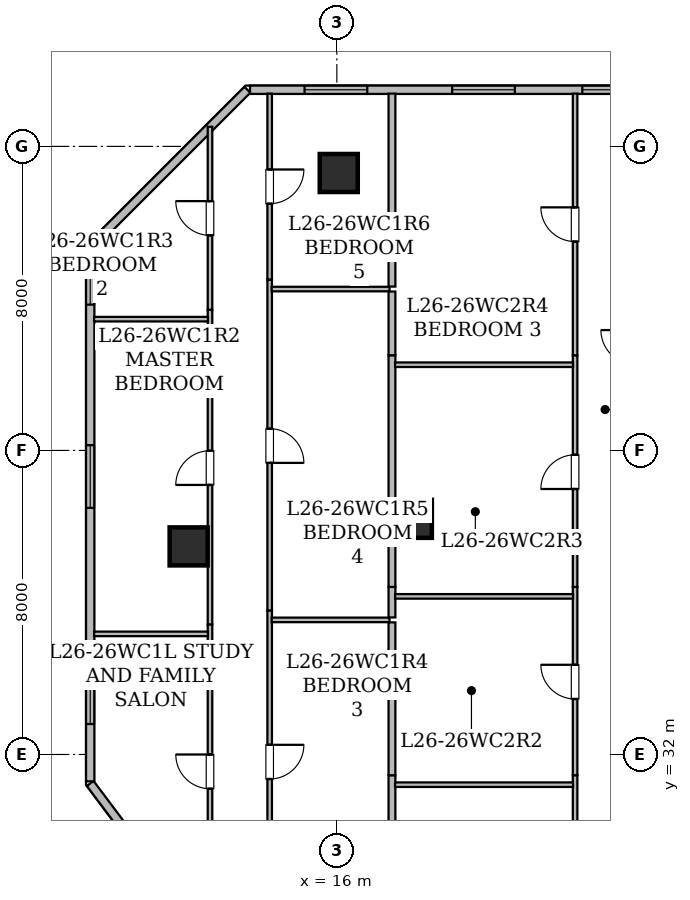
"""IFC4 building model, lengths in metres.
Left out: names, types, materials, properties, quantities, classifications, styles, units other than length and angle.
Written with IfcOpenShell. Run it as: python <this file> out.ifc"""

import sys

from ifc_helpers import new_model, si_unit, direction, frame, frame_2d, origin, origin_2d, place, context, subcontext, project, spatial, rectangle, hollow_rectangle, extrude, element, fill, save


model = new_model("IFC4")
c1 = context("Model", 3, precision=1e-05, world=origin(), true_north=direction((0.0, 1.0)))
c2 = subcontext(c1, "Body", "Model", "MODEL_VIEW")
j1 = project(units=[si_unit("LENGTHUNIT", "METRE"), si_unit("PLANEANGLEUNIT", "RADIAN")], contexts=[c1])
p1 = place(None, origin())
s1 = spatial("IfcSite", under=j1, at=p1, CompositionType="ELEMENT")
p2 = place(p1, origin())
s2 = spatial("IfcBuilding", under=s1, at=p2, CompositionType="ELEMENT")
p3 = place(p2, frame((0.0, 0.0, 105.55)))
s3 = spatial("IfcBuildingStorey", under=s2, at=p3, CompositionType="ELEMENT", Elevation=105.55)
for number, where, z_axis, x_axis in (
    (1, (16.05, 47.3, 0.0), (0.0, 0.0, 1.0), (1.0, 0.0, 0.0)),
    (2, (12.1, 37.475, 0.0), (0.0, 0.0, 1.0), (1.0, 0.0, 0.0)),
    (3, (18.0, 38.2, 0.0), (0.0, 0.0, 1.0), (1.0, 0.0, 0.0)),
):
    element("IfcColumn", number, at=place(p3, frame(where, z_axis=z_axis, x_axis=x_axis)), inside=s3, PredefinedType="COLUMN", context=c2, shape_type="SweptSolid", body=[
        extrude(hollow_rectangle(XDim=1.0, YDim=1.0, WallThickness=0.05, at=origin_2d()), origin(), (0.0, 0.0, 1.0), 3.65),
    ])
p4 = place(p3, frame((11.881, 28.077, 0.0), z_axis=(0.0, 0.0, 1.0), x_axis=(-0.600158184825, 0.799881336942, 0.0)))
e4 = element("IfcWall", 4, at=p4, inside=s3, PredefinedType="STANDARD", context=c2, shape_type="SweptSolid", body=[
    extrude(rectangle(XDim=3.951, YDim=0.22, at=frame_2d((1.975, 0.0))), origin(), (0.0, 0.0, 1.0), 3.43),
])
p5 = place(p3, frame((9.51, 31.293, 0.0), z_axis=(0.0, 0.0, 1.0), x_axis=(0.0, 1.0, 0.0)))
e5 = element("IfcWall", 5, at=p5, inside=s3, PredefinedType="STANDARD", context=c2, shape_type="SweptSolid", body=[
    extrude(rectangle(XDim=14.061, YDim=0.22, at=frame_2d((7.031, 0.0))), origin(), (0.0, 0.0, 1.0), 3.43),
])
p6 = place(p5, frame((1.508, 0.0, 0.85)))
e6 = element("IfcOpeningElement", 6, at=p6, cuts=e5, PredefinedType="OPENING", context=c2, shape_type="SweptSolid", body=[
    extrude(rectangle(XDim=1.65, YDim=1.55, at=frame_2d((0.825, 0.775))), frame((0.0, 0.12, 0.0), z_axis=(0.0, -1.0, 0.0), x_axis=(1.0, 0.0, 0.0)), (0.0, 0.0, 1.0), 0.24),
])
p7 = place(p5, frame((7.195, 0.0, 0.85)))
e7 = element("IfcOpeningElement", 7, at=p7, cuts=e5, PredefinedType="OPENING", context=c2, shape_type="SweptSolid", body=[
    extrude(rectangle(XDim=1.65, YDim=1.55, at=frame_2d((0.825, 0.775))), frame((0.0, 0.12, 0.0), z_axis=(0.0, -1.0, 0.0), x_axis=(1.0, 0.0, 0.0)), (0.0, 0.0, 1.0), 0.24),
])
p8 = place(p5, frame((12.543, 0.0, 0.85)))
e8 = element("IfcOpeningElement", 8, at=p8, cuts=e5, PredefinedType="OPENING", context=c2, shape_type="SweptSolid", body=[
    extrude(rectangle(XDim=1.35, YDim=1.5, at=frame_2d((0.675, 0.75))), frame((0.0, 0.12, 0.0), z_axis=(0.0, -1.0, 0.0), x_axis=(1.0, 0.0, 0.0)), (0.0, 0.0, 1.0), 0.24),
])
p9 = place(p3, frame((9.558, 45.402, 0.0), z_axis=(0.0, 0.0, 1.0), x_axis=(0.707106781187, 0.707106781187, 0.0)))
e9 = element("IfcWall", 9, at=p9, inside=s3, PredefinedType="STANDARD", context=c2, shape_type="SweptSolid", body=[
    extrude(rectangle(XDim=5.781, YDim=0.22, at=frame_2d((2.891, 0.0))), origin(), (0.0, 0.0, 1.0), 3.43),
])
p10 = place(p3, frame((13.715, 49.49, 0.0), z_axis=(0.0, 0.0, 1.0), x_axis=(1.0, 0.0, 0.0)))
e10 = element("IfcWall", 10, at=p10, inside=s3, PredefinedType="STANDARD", context=c2, shape_type="SweptSolid", body=[
    extrude(rectangle(XDim=38.639, YDim=0.22, at=frame_2d((19.319, 0.0))), origin(), (0.0, 0.0, 1.0), 3.43),
])
p11 = place(p10, frame((1.435, 0.0, 0.85)))
e11 = element("IfcOpeningElement", 11, at=p11, cuts=e10, PredefinedType="OPENING", context=c2, shape_type="SweptSolid", body=[
    extrude(rectangle(XDim=1.65, YDim=1.55, at=frame_2d((0.825, 0.775))), frame((0.0, 0.12, 0.0), z_axis=(0.0, -1.0, 0.0), x_axis=(1.0, 0.0, 0.0)), (0.0, 0.0, 1.0), 0.24),
])
p12 = place(p10, frame((10.802, 0.0, 0.85)))
e12 = element("IfcOpeningElement", 12, at=p12, cuts=e10, PredefinedType="OPENING", context=c2, shape_type="SweptSolid", body=[
    extrude(rectangle(XDim=1.65, YDim=1.55, at=frame_2d((0.825, 0.775))), frame((0.0, 0.12, 0.0), z_axis=(0.0, -1.0, 0.0), x_axis=(1.0, 0.0, 0.0)), (0.0, 0.0, 1.0), 0.24),
])
p13 = place(p10, frame((8.744, 0.0, 0.8)))
e13 = element("IfcOpeningElement", 13, at=p13, cuts=e10, PredefinedType="OPENING", context=c2, shape_type="SweptSolid", body=[
    extrude(rectangle(XDim=1.2, YDim=1.5, at=frame_2d((0.6, 0.75))), frame((0.0, 0.12, 0.0), z_axis=(0.0, -1.0, 0.0), x_axis=(1.0, 0.0, 0.0)), (0.0, 0.0, 1.0), 0.24),
])
p14 = place(p10, frame((5.319, 0.0, 0.85)))
e14 = element("IfcOpeningElement", 14, at=p14, cuts=e10, PredefinedType="OPENING", context=c2, shape_type="SweptSolid", body=[
    extrude(rectangle(XDim=1.65, YDim=1.55, at=frame_2d((0.825, 0.775))), frame((0.0, 0.12, 0.0), z_axis=(0.0, -1.0, 0.0), x_axis=(1.0, 0.0, 0.0)), (0.0, 0.0, 1.0), 0.24),
])
p15 = place(p10, frame((15.665, 0.0, 0.85)))
e15 = element("IfcOpeningElement", 15, at=p15, cuts=e10, PredefinedType="OPENING", context=c2, shape_type="SweptSolid", body=[
    extrude(rectangle(XDim=1.65, YDim=1.55, at=frame_2d((0.825, 0.775))), frame((0.0, 0.12, 0.0), z_axis=(0.0, -1.0, 0.0), x_axis=(1.0, 0.0, 0.0)), (0.0, 0.0, 1.0), 0.24),
])
p16 = place(p10, frame((22.93, 0.0, 0.85)))
e16 = element("IfcOpeningElement", 16, at=p16, cuts=e10, PredefinedType="OPENING", context=c2, shape_type="SweptSolid", body=[
    extrude(rectangle(XDim=1.65, YDim=1.55, at=frame_2d((0.825, 0.775))), frame((0.0, 0.12, 0.0), z_axis=(0.0, -1.0, 0.0), x_axis=(1.0, 0.0, 0.0)), (0.0, 0.0, 1.0), 0.24),
])
p17 = place(p10, frame((30.23, 0.0, 0.85)))
e17 = element("IfcOpeningElement", 17, at=p17, cuts=e10, PredefinedType="OPENING", context=c2, shape_type="SweptSolid", body=[
    extrude(rectangle(XDim=1.65, YDim=1.55, at=frame_2d((0.825, 0.775))), frame((0.0, 0.12, 0.0), z_axis=(0.0, -1.0, 0.0), x_axis=(1.0, 0.0, 0.0)), (0.0, 0.0, 1.0), 0.24),
])
p18 = place(p10, frame((36.367, 0.0, 0.85)))
e18 = element("IfcOpeningElement", 18, at=p18, cuts=e10, PredefinedType="OPENING", context=c2, shape_type="SweptSolid", body=[
    extrude(rectangle(XDim=1.65, YDim=1.55, at=frame_2d((0.825, 0.775))), frame((0.0, 0.12, 0.0), z_axis=(0.0, -1.0, 0.0), x_axis=(1.0, 0.0, 0.0)), (0.0, 0.0, 1.0), 0.24),
])
p19 = place(p3, frame((12.662, 25.26, 0.0), z_axis=(0.0, 0.0, 1.0), x_axis=(0.0, 1.0, 0.0)))
e19 = element("IfcWall", 19, at=p19, inside=s3, PredefinedType="PARTITIONING", context=c2, shape_type="SweptSolid", body=[
    extrude(rectangle(XDim=10.162, YDim=0.12, at=frame_2d((5.081, 0.0))), origin(), (0.0, 0.0, 1.0), 3.43),
])
p20 = place(p19, frame((5.839, 0.0, 0.0)))
e20 = element("IfcOpeningElement", 20, at=p20, cuts=e19, PredefinedType="OPENING", context=c2, shape_type="SweptSolid", body=[
    extrude(rectangle(XDim=0.9, YDim=2.1, at=frame_2d((0.45, 1.05))), frame((0.0, 0.07, 0.0), z_axis=(0.0, -1.0, 0.0), x_axis=(1.0, 0.0, 0.0)), (0.0, 0.0, 1.0), 0.14),
])
p21 = place(p3, frame((12.662, 35.422, 0.0), z_axis=(0.0, 0.0, 1.0), x_axis=(0.0, 1.0, 0.0)))
e21 = element("IfcWall", 21, at=p21, inside=s3, PredefinedType="PARTITIONING", context=c2, shape_type="SweptSolid", body=[
    extrude(rectangle(XDim=8.281, YDim=0.12, at=frame_2d((4.14, 0.0))), origin(), (0.0, 0.0, 1.0), 2.647),
])
p22 = place(p21, frame((3.67, 0.0, 0.0)))
e22 = element("IfcOpeningElement", 22, at=p22, cuts=e21, PredefinedType="OPENING", context=c2, shape_type="SweptSolid", body=[
    extrude(rectangle(XDim=0.9, YDim=2.1, at=frame_2d((0.45, 1.05))), frame((0.0, 0.07, 0.0), z_axis=(0.0, -1.0, 0.0), x_axis=(1.0, 0.0, 0.0)), (0.0, 0.0, 1.0), 0.14),
])
p23 = place(p3, frame((12.662, 43.703, 0.0), z_axis=(0.0, 0.0, 1.0), x_axis=(0.0, 1.0, 0.0)))
e23 = element("IfcWall", 23, at=p23, inside=s3, PredefinedType="PARTITIONING", context=c2, shape_type="SweptSolid", body=[
    extrude(rectangle(XDim=4.814, YDim=0.12, at=frame_2d((2.407, 0.0))), origin(), (0.0, 0.0, 1.0), 3.43),
])
p24 = place(p23, frame((1.957, 0.0, 0.0)))
e24 = element("IfcOpeningElement", 24, at=p24, cuts=e23, PredefinedType="OPENING", context=c2, shape_type="SweptSolid", body=[
    extrude(rectangle(XDim=0.9, YDim=2.1, at=frame_2d((0.45, 1.05))), frame((0.0, 0.07, 0.0), z_axis=(0.0, -1.0, 0.0), x_axis=(1.0, 0.0, 0.0)), (0.0, 0.0, 1.0), 0.14),
])
p25 = place(p3, frame((14.232, 35.79, 0.0), z_axis=(0.0, 0.0, 1.0), x_axis=(0.0, -1.0, 0.0)))
e25 = element("IfcWall", 25, at=p25, inside=s3, PredefinedType="PARTITIONING", context=c2, shape_type="SweptSolid", body=[
    extrude(rectangle(XDim=7.93, YDim=0.12, at=frame_2d((3.965, 0.0))), origin(), (0.0, 0.0, 1.0), 3.43),
])
p26 = place(p25, frame((3.536, 0.0, 0.0)))
e26 = element("IfcOpeningElement", 26, at=p26, cuts=e25, PredefinedType="OPENING", context=c2, shape_type="SweptSolid", body=[
    extrude(rectangle(XDim=0.9, YDim=2.1, at=frame_2d((0.45, 1.05))), frame((0.0, 0.07, 0.0), z_axis=(0.0, -1.0, 0.0), x_axis=(1.0, 0.0, 0.0)), (0.0, 0.0, 1.0), 0.14),
])
p27 = place(p3, frame((14.232, 44.495, 0.0), z_axis=(0.0, 0.0, 1.0), x_axis=(0.0, -1.0, 0.0)))
e27 = element("IfcWall", 27, at=p27, inside=s3, PredefinedType="PARTITIONING", context=c2, shape_type="SweptSolid", body=[
    extrude(rectangle(XDim=8.705, YDim=0.12, at=frame_2d((4.353, 0.0))), origin(), (0.0, 0.0, 1.0), 2.647),
])
p28 = place(p27, frame((3.923, 0.0, 0.0)))
e28 = element("IfcOpeningElement", 28, at=p28, cuts=e27, PredefinedType="OPENING", context=c2, shape_type="SweptSolid", body=[
    extrude(rectangle(XDim=0.9, YDim=2.1, at=frame_2d((0.45, 1.05))), frame((0.0, 0.07, 0.0), z_axis=(0.0, -1.0, 0.0), x_axis=(1.0, 0.0, 0.0)), (0.0, 0.0, 1.0), 0.14),
])
p29 = place(p3, frame((14.232, 49.388, 0.0), z_axis=(0.0, 0.0, 1.0), x_axis=(0.0, -1.0, 0.0)))
e29 = element("IfcWall", 29, at=p29, inside=s3, PredefinedType="PARTITIONING", context=c2, shape_type="SweptSolid", body=[
    extrude(rectangle(XDim=4.893, YDim=0.12, at=frame_2d((2.446, 0.0))), origin(), (0.0, 0.0, 1.0), 3.43),
])
p30 = place(p29, frame((1.996, 0.0, 0.0)))
e30 = element("IfcOpeningElement", 30, at=p30, cuts=e29, PredefinedType="OPENING", context=c2, shape_type="SweptSolid", body=[
    extrude(rectangle(XDim=0.9, YDim=2.1, at=frame_2d((0.45, 1.05))), frame((0.0, 0.07, 0.0), z_axis=(0.0, -1.0, 0.0), x_axis=(1.0, 0.0, 0.0)), (0.0, 0.0, 1.0), 0.14),
])
p31 = place(p3, frame((9.612, 35.173, 0.0), z_axis=(0.0, 0.0, 1.0), x_axis=(1.0, 0.0, 0.0)))
e31 = element("IfcWall", 31, at=p31, inside=s3, PredefinedType="PARTITIONING", context=c2, shape_type="SweptSolid", body=[
    extrude(rectangle(XDim=2.996, YDim=0.12, at=frame_2d((1.498, 0.0))), origin(), (0.0, 0.0, 1.0), 2.876),
])
p32 = place(p3, frame((9.612, 43.454, 0.0), z_axis=(0.0, 0.0, 1.0), x_axis=(1.0, 0.0, 0.0)))
e32 = element("IfcWall", 32, at=p32, inside=s3, PredefinedType="PARTITIONING", context=c2, shape_type="SweptSolid", body=[
    extrude(rectangle(XDim=2.996, YDim=0.12, at=frame_2d((1.498, 0.0))), origin(), (0.0, 0.0, 1.0), 3.43),
])
p33 = place(p3, frame((14.286, 35.541, 0.0), z_axis=(0.0, 0.0, 1.0), x_axis=(1.0, 0.0, 0.0)))
e33 = element("IfcWall", 33, at=p33, inside=s3, PredefinedType="PARTITIONING", context=c2, shape_type="SweptSolid", body=[
    extrude(rectangle(XDim=3.099, YDim=0.12, at=frame_2d((1.55, 0.0))), origin(), (0.0, 0.0, 1.0), 3.43),
])
p34 = place(p3, frame((17.45, 31.454, 0.0), z_axis=(0.0, 0.0, 1.0), x_axis=(0.0, -1.0, 0.0)))
e34 = element("IfcWall", 34, at=p34, inside=s3, PredefinedType="STANDARD", context=c2, shape_type="SweptSolid", body=[
    extrude(rectangle(XDim=3.464, YDim=0.18, at=frame_2d((1.732, 0.0))), origin(), (0.0, 0.0, 1.0), 3.43),
])
p35 = place(p3, frame((17.45, 35.476, 0.0), z_axis=(0.0, 0.0, 1.0), x_axis=(0.0, -1.0, 0.0)))
e35 = element("IfcWall", 35, at=p35, inside=s3, PredefinedType="STANDARD", context=c2, shape_type="SweptSolid", body=[
    extrude(rectangle(XDim=4.022, YDim=0.18, at=frame_2d((2.011, 0.0))), origin(), (0.0, 0.0, 1.0), 3.43),
])
p36 = place(p3, frame((14.286, 44.246, 0.0), z_axis=(0.0, 0.0, 1.0), x_axis=(1.0, 0.0, 0.0)))
e36 = element("IfcWall", 36, at=p36, inside=s3, PredefinedType="PARTITIONING", context=c2, shape_type="SweptSolid", body=[
    extrude(rectangle(XDim=3.099, YDim=0.12, at=frame_2d((1.55, 0.0))), origin(), (0.0, 0.0, 1.0), 2.647),
])
p37 = place(p3, frame((17.45, 36.409, 0.0), z_axis=(0.0, 0.0, 1.0), x_axis=(0.0, -1.0, 0.0)))
e37 = element("IfcWall", 37, at=p37, inside=s3, PredefinedType="STANDARD", context=c2, shape_type="SweptSolid", body=[
    extrude(rectangle(XDim=0.803, YDim=0.18, at=frame_2d((0.401, 0.0))), origin(), (0.0, 0.0, 1.0), 3.43),
])
p38 = place(p3, frame((17.45, 42.504, 0.0), z_axis=(0.0, 0.0, 1.0), x_axis=(0.0, -1.0, 0.0)))
e38 = element("IfcWall", 38, at=p38, inside=s3, PredefinedType="STANDARD", context=c2, shape_type="SweptSolid", body=[
    extrude(rectangle(XDim=6.095, YDim=0.18, at=frame_2d((3.047, 0.0))), origin(), (0.0, 0.0, 1.0), 2.647),
])
p39 = place(p3, frame((17.45, 44.181, 0.0), z_axis=(0.0, 0.0, 1.0), x_axis=(0.0, -1.0, 0.0)))
e39 = element("IfcWall", 39, at=p39, inside=s3, PredefinedType="STANDARD", context=c2, shape_type="SweptSolid", body=[
    extrude(rectangle(XDim=1.677, YDim=0.18, at=frame_2d((0.838, 0.0))), origin(), (0.0, 0.0, 1.0), 2.647),
])
p40 = place(p3, frame((17.45, 49.388, 0.0), z_axis=(0.0, 0.0, 1.0), x_axis=(0.0, -1.0, 0.0)))
e40 = element("IfcWall", 40, at=p40, inside=s3, PredefinedType="STANDARD", context=c2, shape_type="SweptSolid", body=[
    extrude(rectangle(XDim=5.077, YDim=0.18, at=frame_2d((2.539, 0.0))), origin(), (0.0, 0.0, 1.0), 2.876),
])
p41 = place(p3, frame((22.269, 22.832, 0.0), z_axis=(0.0, 0.0, 1.0), x_axis=(0.0, 1.0, 0.0)))
e41 = element("IfcWall", 41, at=p41, inside=s3, PredefinedType="PARTITIONING", context=c2, shape_type="SweptSolid", body=[
    extrude(rectangle(XDim=8.622, YDim=0.12, at=frame_2d((4.311, 0.0))), origin(), (0.0, 0.0, 1.0), 2.961),
])
p42 = place(p41, frame((3.84, 0.0, 0.0)))
e42 = element("IfcOpeningElement", 42, at=p42, cuts=e41, PredefinedType="OPENING", context=c2, shape_type="SweptSolid", body=[
    extrude(rectangle(XDim=0.9, YDim=2.1, at=frame_2d((0.45, 1.05))), frame((0.0, 0.07, 0.0), z_axis=(0.0, -1.0, 0.0), x_axis=(1.0, 0.0, 0.0)), (0.0, 0.0, 1.0), 0.14),
])
p43 = place(p3, frame((22.269, 31.454, 0.0), z_axis=(0.0, 0.0, 1.0), x_axis=(0.0, 1.0, 0.0)))
e43 = element("IfcWall", 43, at=p43, inside=s3, PredefinedType="PARTITIONING", context=c2, shape_type="SweptSolid", body=[
    extrude(rectangle(XDim=4.955, YDim=0.12, at=frame_2d((2.478, 0.0))), origin(), (0.0, 0.0, 1.0), 3.43),
])
p44 = place(p43, frame((2.006, 0.0, 0.0)))
e44 = element("IfcOpeningElement", 44, at=p44, cuts=e43, PredefinedType="OPENING", context=c2, shape_type="SweptSolid", body=[
    extrude(rectangle(XDim=0.9, YDim=2.1, at=frame_2d((0.45, 1.05))), frame((0.0, 0.07, 0.0), z_axis=(0.0, -1.0, 0.0), x_axis=(1.0, 0.0, 0.0)), (0.0, 0.0, 1.0), 0.14),
])
p45 = place(p3, frame((22.269, 36.409, 0.0), z_axis=(0.0, 0.0, 1.0), x_axis=(0.0, 1.0, 0.0)))
e45 = element("IfcWall", 45, at=p45, inside=s3, PredefinedType="PARTITIONING", context=c2, shape_type="SweptSolid", body=[
    extrude(rectangle(XDim=6.095, YDim=0.12, at=frame_2d((3.047, 0.0))), origin(), (0.0, 0.0, 1.0), 2.647),
])
p46 = place(p45, frame((2.576, 0.0, 0.0)))
e46 = element("IfcOpeningElement", 46, at=p46, cuts=e45, PredefinedType="OPENING", context=c2, shape_type="SweptSolid", body=[
    extrude(rectangle(XDim=0.9, YDim=2.1, at=frame_2d((0.45, 1.05))), frame((0.0, 0.07, 0.0), z_axis=(0.0, -1.0, 0.0), x_axis=(1.0, 0.0, 0.0)), (0.0, 0.0, 1.0), 0.14),
])
p47 = place(p3, frame((22.269, 42.504, 0.0), z_axis=(0.0, 0.0, 1.0), x_axis=(0.0, 1.0, 0.0)))
e47 = element("IfcWall", 47, at=p47, inside=s3, PredefinedType="PARTITIONING", context=c2, shape_type="SweptSolid", body=[
    extrude(rectangle(XDim=6.884, YDim=0.12, at=frame_2d((3.442, 0.0))), origin(), (0.0, 0.0, 1.0), 2.876),
])
p48 = place(p47, frame((2.992, 0.0, 0.0)))
e48 = element("IfcOpeningElement", 48, at=p48, cuts=e47, PredefinedType="OPENING", context=c2, shape_type="SweptSolid", body=[
    extrude(rectangle(XDim=0.9, YDim=2.1, at=frame_2d((0.45, 1.05))), frame((0.0, 0.07, 0.0), z_axis=(0.0, -1.0, 0.0), x_axis=(1.0, 0.0, 0.0)), (0.0, 0.0, 1.0), 0.14),
])
for number, where, z_axis, x_axis in (
    (49, (17.532, 31.205, 0.0), (0.0, 0.0, 1.0), (1.0, 0.0, 0.0)),
    (50, (17.532, 36.16, 0.0), (0.0, 0.0, 1.0), (1.0, 0.0, 0.0)),
):
    element("IfcWall", number, at=place(p3, frame(where, z_axis=z_axis, x_axis=x_axis)), inside=s3, PredefinedType="PARTITIONING", context=c2, shape_type="SweptSolid", body=[
        extrude(rectangle(XDim=4.683, YDim=0.12, at=frame_2d((2.342, 0.0))), origin(), (0.0, 0.0, 1.0), 2.647),
    ])
p49 = place(p3, frame((17.532, 42.255, 0.0), z_axis=(0.0, 0.0, 1.0), x_axis=(1.0, 0.0, 0.0)))
e51 = element("IfcWall", 51, at=p49, inside=s3, PredefinedType="PARTITIONING", context=c2, shape_type="SweptSolid", body=[
    extrude(rectangle(XDim=4.683, YDim=0.12, at=frame_2d((2.342, 0.0))), origin(), (0.0, 0.0, 1.0), 3.43),
])
p50 = place(p6, origin())
e52 = element("IfcWindow", 52, at=p50, inside=s3, PartitioningType="SINGLE_PANEL", PredefinedType="WINDOW", context=c2, shape_type="SweptSolid", body=[
    extrude(rectangle(XDim=1.65, YDim=1.55, at=frame_2d((0.825, 0.775))), frame((0.0, 0.03, 0.0), z_axis=(0.0, -1.0, 0.0), x_axis=(1.0, 0.0, 0.0)), (0.0, 0.0, 1.0), 0.06),
])
fill(e6, e52)
p51 = place(p7, origin())
e53 = element("IfcWindow", 53, at=p51, inside=s3, PartitioningType="SINGLE_PANEL", PredefinedType="WINDOW", context=c2, shape_type="SweptSolid", body=[
    extrude(rectangle(XDim=1.65, YDim=1.55, at=frame_2d((0.825, 0.775))), frame((0.0, 0.03, 0.0), z_axis=(0.0, -1.0, 0.0), x_axis=(1.0, 0.0, 0.0)), (0.0, 0.0, 1.0), 0.06),
])
fill(e7, e53)
p52 = place(p8, origin())
e54 = element("IfcWindow", 54, at=p52, inside=s3, PartitioningType="SINGLE_PANEL", PredefinedType="WINDOW", context=c2, shape_type="SweptSolid", body=[
    extrude(rectangle(XDim=1.35, YDim=1.5, at=frame_2d((0.675, 0.75))), frame((0.0, 0.03, 0.0), z_axis=(0.0, -1.0, 0.0), x_axis=(1.0, 0.0, 0.0)), (0.0, 0.0, 1.0), 0.06),
])
fill(e8, e54)
p53 = place(p11, origin())
e55 = element("IfcWindow", 55, at=p53, inside=s3, PartitioningType="SINGLE_PANEL", PredefinedType="WINDOW", context=c2, shape_type="SweptSolid", body=[
    extrude(rectangle(XDim=1.65, YDim=1.55, at=frame_2d((0.825, 0.775))), frame((0.0, 0.03, 0.0), z_axis=(0.0, -1.0, 0.0), x_axis=(1.0, 0.0, 0.0)), (0.0, 0.0, 1.0), 0.06),
])
fill(e11, e55)
p54 = place(p13, origin())
e56 = element("IfcWindow", 56, at=p54, inside=s3, PartitioningType="SINGLE_PANEL", PredefinedType="WINDOW", context=c2, shape_type="SweptSolid", body=[
    extrude(rectangle(XDim=1.2, YDim=1.5, at=frame_2d((0.6, 0.75))), frame((0.0, 0.03, 0.0), z_axis=(0.0, -1.0, 0.0), x_axis=(1.0, 0.0, 0.0)), (0.0, 0.0, 1.0), 0.06),
])
fill(e13, e56)
p55 = place(p14, origin())
e57 = element("IfcWindow", 57, at=p55, inside=s3, PartitioningType="SINGLE_PANEL", PredefinedType="WINDOW", context=c2, shape_type="SweptSolid", body=[
    extrude(rectangle(XDim=1.65, YDim=1.55, at=frame_2d((0.825, 0.775))), frame((0.0, 0.03, 0.0), z_axis=(0.0, -1.0, 0.0), x_axis=(1.0, 0.0, 0.0)), (0.0, 0.0, 1.0), 0.06),
])
fill(e14, e57)
p56 = place(p20, origin())
e58 = element("IfcDoor", 58, at=p56, inside=s3, OperationType="SINGLE_SWING_RIGHT", PredefinedType="DOOR", context=c2, shape_type="SweptSolid", body=[
    extrude(rectangle(XDim=0.9, YDim=2.1, at=frame_2d((0.45, 1.05))), frame((0.0, 0.025, 0.0), z_axis=(0.0, -1.0, 0.0), x_axis=(1.0, 0.0, 0.0)), (0.0, 0.0, 1.0), 0.05),
])
fill(e20, e58)
p57 = place(p22, origin())
e59 = element("IfcDoor", 59, at=p57, inside=s3, OperationType="SINGLE_SWING_LEFT", PredefinedType="DOOR", context=c2, shape_type="SweptSolid", body=[
    extrude(rectangle(XDim=0.9, YDim=2.1, at=frame_2d((0.45, 1.05))), frame((0.0, 0.025, 0.0), z_axis=(0.0, -1.0, 0.0), x_axis=(1.0, 0.0, 0.0)), (0.0, 0.0, 1.0), 0.05),
])
fill(e22, e59)
p58 = place(p24, origin())
e60 = element("IfcDoor", 60, at=p58, inside=s3, OperationType="SINGLE_SWING_RIGHT", PredefinedType="DOOR", context=c2, shape_type="SweptSolid", body=[
    extrude(rectangle(XDim=0.9, YDim=2.1, at=frame_2d((0.45, 1.05))), frame((0.0, 0.025, 0.0), z_axis=(0.0, -1.0, 0.0), x_axis=(1.0, 0.0, 0.0)), (0.0, 0.0, 1.0), 0.05),
])
fill(e24, e60)
p59 = place(p26, origin())
e61 = element("IfcDoor", 61, at=p59, inside=s3, OperationType="SINGLE_SWING_LEFT", PredefinedType="DOOR", context=c2, shape_type="SweptSolid", body=[
    extrude(rectangle(XDim=0.9, YDim=2.1, at=frame_2d((0.45, 1.05))), frame((0.0, 0.025, 0.0), z_axis=(0.0, -1.0, 0.0), x_axis=(1.0, 0.0, 0.0)), (0.0, 0.0, 1.0), 0.05),
])
fill(e26, e61)
p60 = place(p28, origin())
e62 = element("IfcDoor", 62, at=p60, inside=s3, OperationType="SINGLE_SWING_RIGHT", PredefinedType="DOOR", context=c2, shape_type="SweptSolid", body=[
    extrude(rectangle(XDim=0.9, YDim=2.1, at=frame_2d((0.45, 1.05))), frame((0.0, 0.025, 0.0), z_axis=(0.0, -1.0, 0.0), x_axis=(1.0, 0.0, 0.0)), (0.0, 0.0, 1.0), 0.05),
])
fill(e28, e62)
p61 = place(p30, origin())
e63 = element("IfcDoor", 63, at=p61, inside=s3, OperationType="SINGLE_SWING_LEFT", PredefinedType="DOOR", context=c2, shape_type="SweptSolid", body=[
    extrude(rectangle(XDim=0.9, YDim=2.1, at=frame_2d((0.45, 1.05))), frame((0.0, 0.025, 0.0), z_axis=(0.0, -1.0, 0.0), x_axis=(1.0, 0.0, 0.0)), (0.0, 0.0, 1.0), 0.05),
])
fill(e30, e63)
p62 = place(p44, origin())
e64 = element("IfcDoor", 64, at=p62, inside=s3, OperationType="SINGLE_SWING_RIGHT", PredefinedType="DOOR", context=c2, shape_type="SweptSolid", body=[
    extrude(rectangle(XDim=0.9, YDim=2.1, at=frame_2d((0.45, 1.05))), frame((0.0, 0.025, 0.0), z_axis=(0.0, -1.0, 0.0), x_axis=(1.0, 0.0, 0.0)), (0.0, 0.0, 1.0), 0.05),
])
fill(e44, e64)
p63 = place(p46, origin())
e65 = element("IfcDoor", 65, at=p63, inside=s3, OperationType="SINGLE_SWING_LEFT", PredefinedType="DOOR", context=c2, shape_type="SweptSolid", body=[
    extrude(rectangle(XDim=0.9, YDim=2.1, at=frame_2d((0.45, 1.05))), frame((0.0, 0.025, 0.0), z_axis=(0.0, -1.0, 0.0), x_axis=(1.0, 0.0, 0.0)), (0.0, 0.0, 1.0), 0.05),
])
fill(e46, e65)
p64 = place(p48, origin())
e66 = element("IfcDoor", 66, at=p64, inside=s3, OperationType="SINGLE_SWING_RIGHT", PredefinedType="DOOR", context=c2, shape_type="SweptSolid", body=[
    extrude(rectangle(XDim=0.9, YDim=2.1, at=frame_2d((0.45, 1.05))), frame((0.0, 0.025, 0.0), z_axis=(0.0, -1.0, 0.0), x_axis=(1.0, 0.0, 0.0)), (0.0, 0.0, 1.0), 0.05),
])
fill(e48, e66)
save(model, sys.argv[1])
